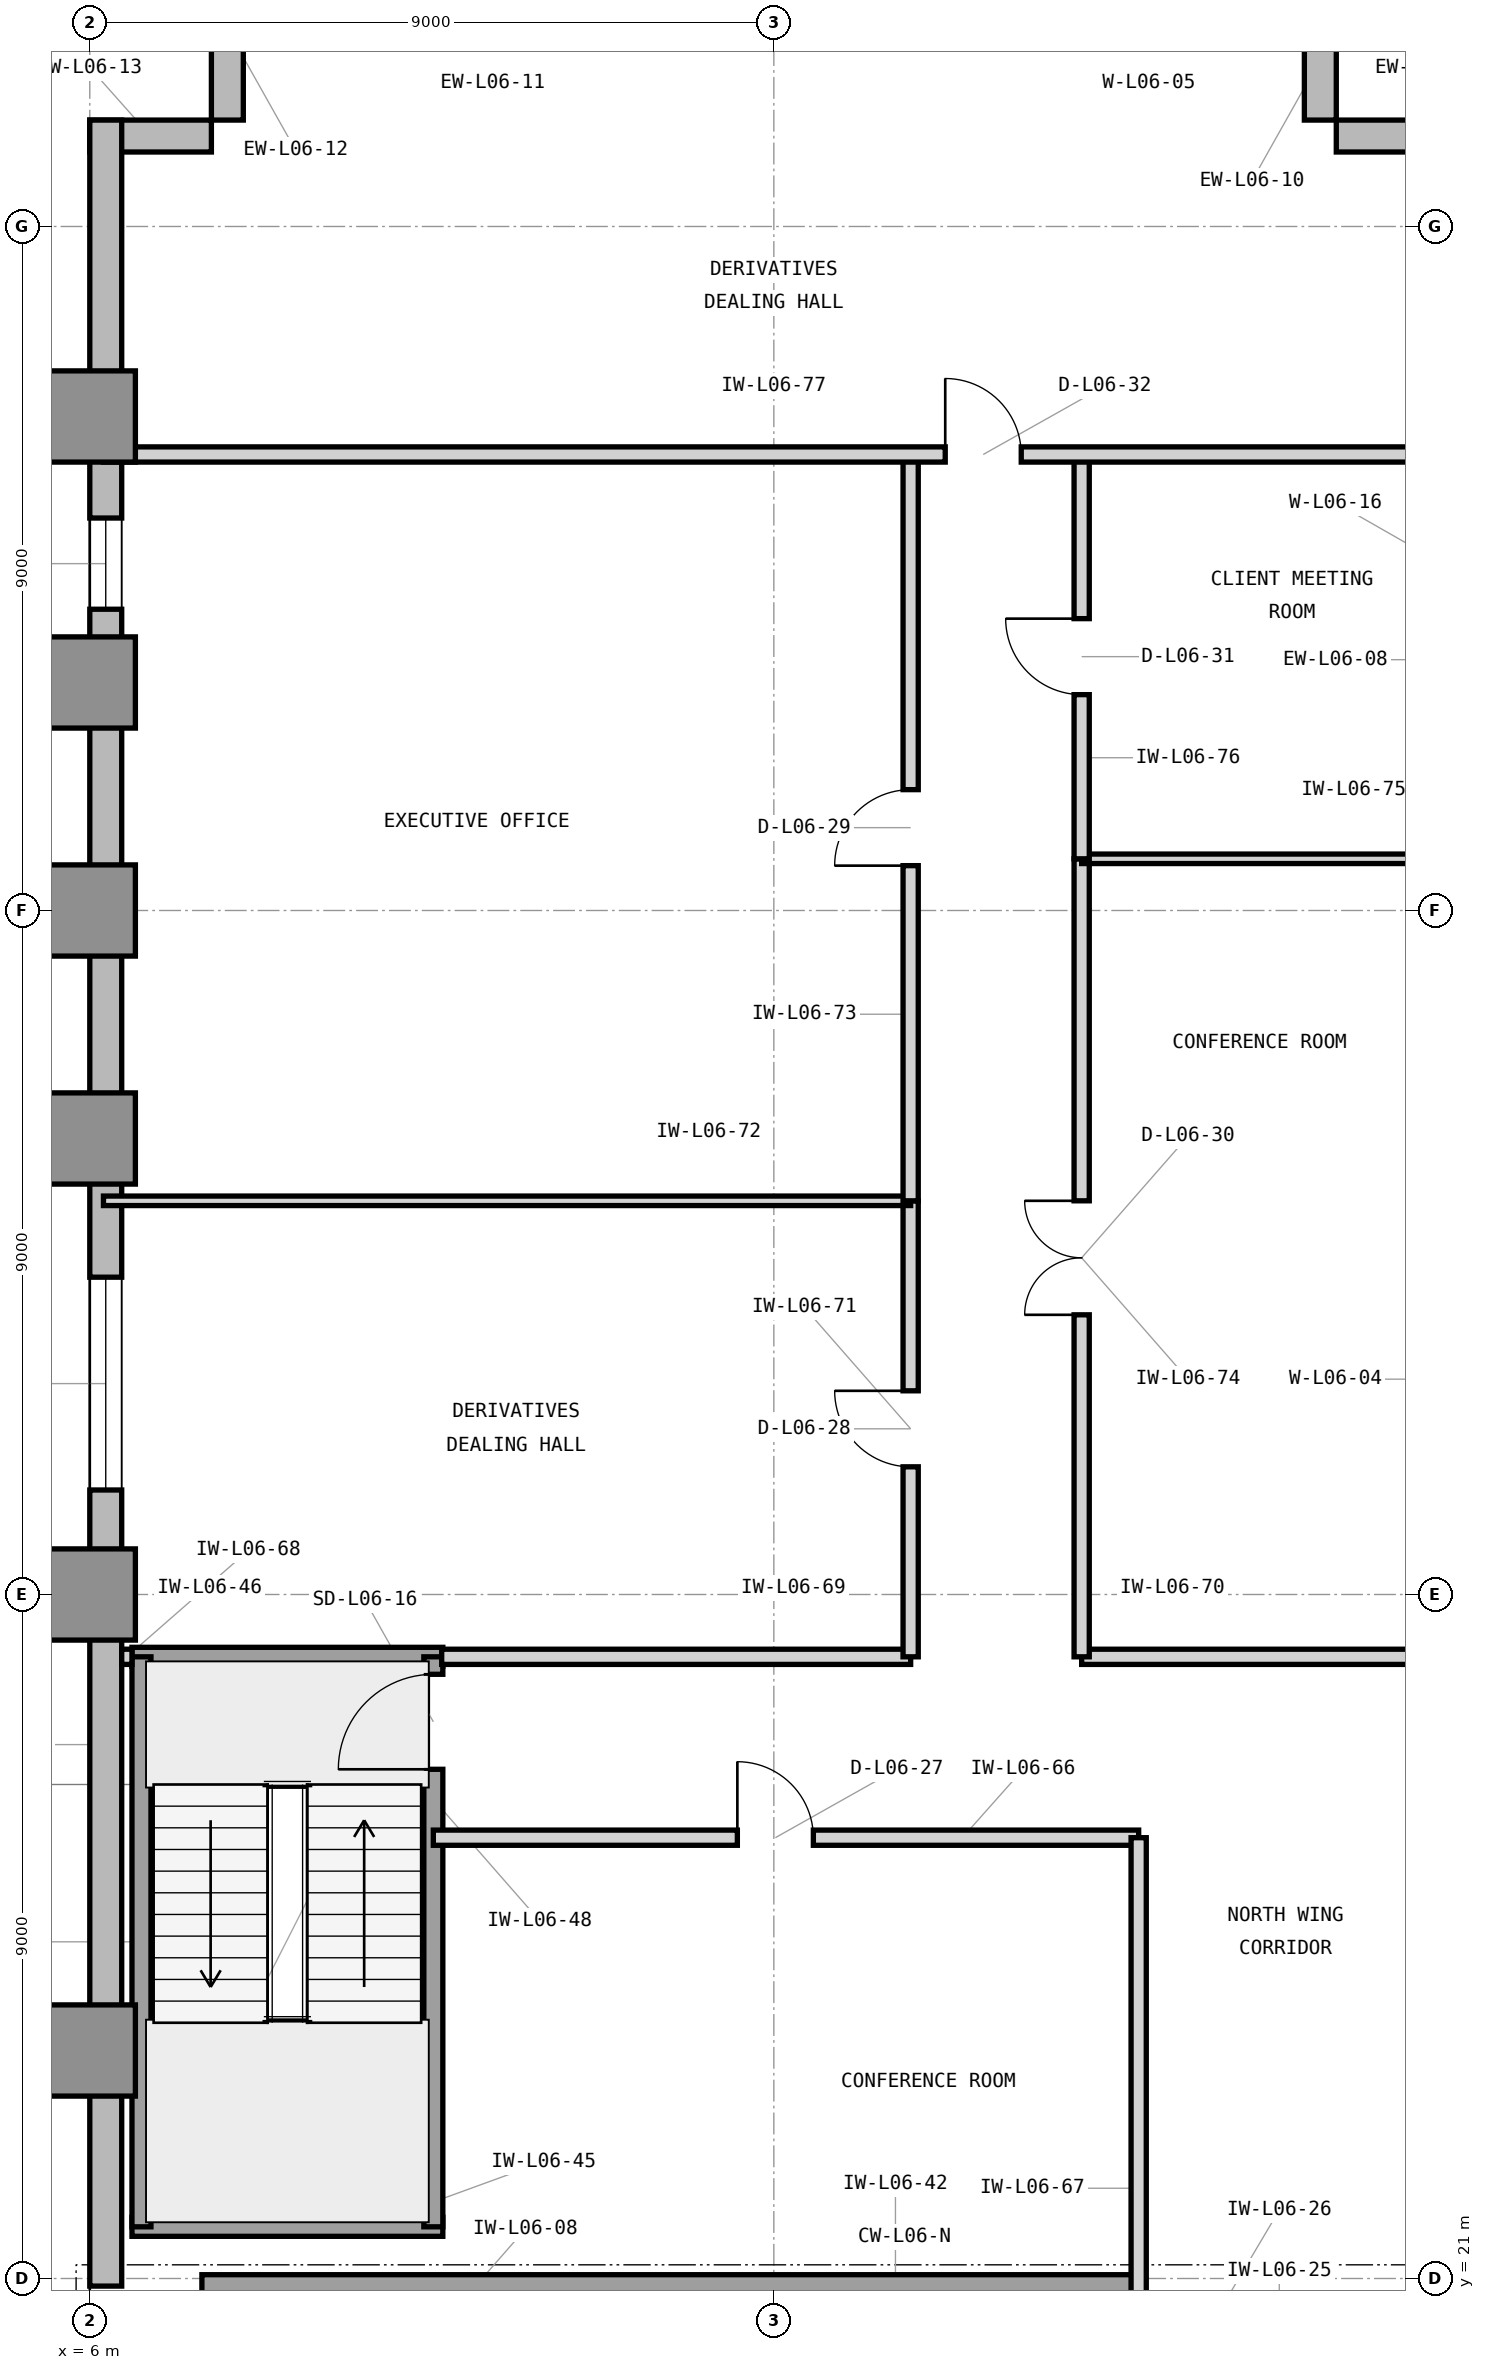
"""IFC4 building model, lengths in metres.
Left out: names, types, materials, properties, quantities, classifications, styles, units other than length and angle.
Written with IfcOpenShell. Run it as: python <this file> out.ifc"""

import sys

from ifc_helpers import new_model, si_unit, direction, frame, frame_2d, origin, origin_2d, place, context, subcontext, project, spatial, rectangle, extrude, element, fill, save


model = new_model("IFC4")
c1 = context("Model", 3, precision=1e-05, world=origin(), true_north=direction((0.0, 1.0)))
c2 = subcontext(c1, "Body", "Model", "MODEL_VIEW")
j1 = project(units=[si_unit("LENGTHUNIT", "METRE"), si_unit("PLANEANGLEUNIT", "RADIAN")], contexts=[c1])
p1 = place(None, origin())
s1 = spatial("IfcSite", under=j1, at=p1, CompositionType="ELEMENT")
p2 = place(p1, origin())
s2 = spatial("IfcBuilding", under=s1, at=p2, CompositionType="ELEMENT")
p3 = place(p2, frame((0.0, 0.0, 30.0)))
s3 = spatial("IfcBuildingStorey", under=s2, at=p3, CompositionType="ELEMENT", Elevation=30.0)
p4 = place(p3, frame((7.475, 20.65, 0.0), z_axis=(0.0, 0.0, 1.0), x_axis=(1.0, 0.0, 0.0)))
e1 = element("IfcWall", 1, at=p4, inside=s3, PredefinedType="SHEAR", context=c2, shape_type="SweptSolid", body=[
    extrude(rectangle(XDim=12.325, YDim=0.8, at=frame_2d((6.163, 0.0))), origin(), (0.0, 0.0, 1.0), 4.2),
])
for number, where, z_axis, x_axis in (
    (2, (6.0, 24.0, 0.0), (0.0, 0.0, 1.0), (1.0, 0.0, 0.0)),
    (3, (6.0, 30.0, 0.0), (0.0, 0.0, 1.0), (1.0, 0.0, 0.0)),
    (4, (6.0, 36.0, 0.0), (0.0, 0.0, 1.0), (1.0, 0.0, 0.0)),
    (5, (6.0, 39.0, 0.0), (0.0, 0.0, 1.0), (1.0, 0.0, 0.0)),
    (6, (6.0, 42.0, 0.0), (0.0, 0.0, 1.0), (1.0, 0.0, 0.0)),
    (7, (6.0, 45.5, 0.0), (0.0, 0.0, 1.0), (1.0, 0.0, 0.0)),
):
    element("IfcColumn", number, at=place(p3, frame(where, z_axis=z_axis, x_axis=x_axis)), inside=s3, PredefinedType="COLUMN", context=c2, shape_type="SweptSolid", body=[
        extrude(rectangle(XDim=1.2, YDim=1.2, at=origin_2d()), origin(), (0.0, 0.0, 1.0), 4.2),
    ])
for number, where, z_axis, x_axis in (
    (8, (24.0, 49.19, 0.0), (0.0, 0.0, 1.0), (-1.0, 0.0, 0.0)),
    (9, (22.19, 49.4, 0.0), (0.0, 0.0, 1.0), (0.0, 1.0, 0.0)),
    (10, (7.81, 51.0, 0.0), (0.0, 0.0, 1.0), (0.0, -1.0, 0.0)),
    (11, (7.6, 49.19, 0.0), (0.0, 0.0, 1.0), (-1.0, 0.0, 0.0)),
):
    element("IfcWall", number, at=place(p3, frame(where, z_axis=z_axis, x_axis=x_axis)), inside=s3, PredefinedType="STANDARD", context=c2, shape_type="SweptSolid", body=[
        extrude(rectangle(XDim=1.6, YDim=0.42, at=frame_2d((0.8, 0.0))), origin(), (0.0, 0.0, 1.0), 3.98),
    ])
p5 = place(p3, frame((6.21, 49.4, 0.0), z_axis=(0.0, 0.0, 1.0), x_axis=(0.0, -1.0, 0.0)))
e12 = element("IfcWall", 12, at=p5, inside=s3, PredefinedType="STANDARD", context=c2, shape_type="SweptSolid", body=[
    extrude(rectangle(XDim=28.5, YDim=0.42, at=frame_2d((14.25, 0.0))), origin(), (0.0, 0.0, 1.0), 3.98),
])
p6 = place(p5, frame((15.225, 0.0, 0.85)))
e13 = element("IfcOpeningElement", 13, at=p6, cuts=e12, PredefinedType="OPENING", context=c2, shape_type="SweptSolid", body=[
    extrude(rectangle(XDim=2.8, YDim=2.45, at=frame_2d((1.4, 1.225))), frame((0.0, 0.22, 0.0), z_axis=(0.0, -1.0, 0.0), x_axis=(1.0, 0.0, 0.0)), (0.0, 0.0, 1.0), 0.44),
])
p7 = place(p5, frame((5.236, 0.0, 0.85)))
e14 = element("IfcOpeningElement", 14, at=p7, cuts=e12, PredefinedType="OPENING", context=c2, shape_type="SweptSolid", body=[
    extrude(rectangle(XDim=1.2, YDim=2.45, at=frame_2d((0.6, 1.225))), frame((0.0, 0.22, 0.0), z_axis=(0.0, -1.0, 0.0), x_axis=(1.0, 0.0, 0.0)), (0.0, 0.0, 1.0), 0.44),
])
for number, where, z_axis, x_axis in (
    (15, (6.555, 21.68, 0.0), (0.0, 0.0, 1.0), (1.0, 0.0, 0.0)),
    (16, (6.555, 29.18, 0.0), (0.0, 0.0, 1.0), (1.0, 0.0, 0.0)),
):
    element("IfcWall", number, at=place(p3, frame(where, z_axis=z_axis, x_axis=x_axis)), inside=s3, PredefinedType="SHEAR", context=c2, shape_type="SweptSolid", body=[
        extrude(rectangle(XDim=4.09, YDim=0.25, at=frame_2d((2.045, 0.0))), origin(), (0.0, 0.0, 1.0), 4.2),
    ])
p8 = place(p3, frame((6.68, 21.68, 0.0), z_axis=(0.0, 0.0, 1.0), x_axis=(0.0, 1.0, 0.0)))
e17 = element("IfcWall", 17, at=p8, inside=s3, PredefinedType="SHEAR", context=c2, shape_type="SweptSolid", body=[
    extrude(rectangle(XDim=7.5, YDim=0.25, at=frame_2d((3.75, 0.0))), origin(), (0.0, 0.0, 1.0), 4.2),
])
p9 = place(p3, frame((10.52, 21.68, 0.0), z_axis=(0.0, 0.0, 1.0), x_axis=(0.0, 1.0, 0.0)))
e18 = element("IfcWall", 18, at=p9, inside=s3, PredefinedType="SHEAR", context=c2, shape_type="SweptSolid", body=[
    extrude(rectangle(XDim=7.5, YDim=0.25, at=frame_2d((3.75, 0.0))), origin(), (0.0, 0.0, 1.0), 4.2),
])
p10 = place(p9, frame((6.02, 0.0, 0.0)))
e19 = element("IfcOpeningElement", 19, at=p10, cuts=e18, PredefinedType="OPENING", context=c2, shape_type="SweptSolid", body=[
    extrude(rectangle(XDim=1.25, YDim=2.2, at=frame_2d((0.625, 1.1))), frame((0.0, 0.135, 0.0), z_axis=(0.0, -1.0, 0.0), x_axis=(1.0, 0.0, 0.0)), (0.0, 0.0, 1.0), 0.27),
])
p11 = place(p3, frame((10.52, 26.8, 0.0), z_axis=(0.0, 0.0, 1.0), x_axis=(1.0, 0.0, 0.0)))
e20 = element("IfcWall", 20, at=p11, inside=s3, PredefinedType="PARTITIONING", context=c2, shape_type="SweptSolid", body=[
    extrude(rectangle(XDim=9.28, YDim=0.2, at=frame_2d((4.64, 0.0))), origin(), (0.0, 0.0, 1.0), 3.97),
])
p12 = place(p11, frame((4.0, 0.0, 0.0)))
e21 = element("IfcOpeningElement", 21, at=p12, cuts=e20, PredefinedType="OPENING", context=c2, shape_type="SweptSolid", body=[
    extrude(rectangle(XDim=1.0, YDim=2.15, at=frame_2d((0.5, 1.075))), frame((0.0, 0.11, 0.0), z_axis=(0.0, -1.0, 0.0), x_axis=(1.0, 0.0, 0.0)), (0.0, 0.0, 1.0), 0.22),
])
p13 = place(p3, frame((19.8, 20.65, 0.0), z_axis=(0.0, 0.0, 1.0), x_axis=(0.0, 1.0, 0.0)))
e22 = element("IfcWall", 22, at=p13, inside=s3, PredefinedType="PARTITIONING", context=c2, shape_type="SweptSolid", body=[
    extrude(rectangle(XDim=6.15, YDim=0.2, at=frame_2d((3.075, 0.0))), origin(), (0.0, 0.0, 1.0), 3.97),
])
p14 = place(p3, frame((6.42, 29.18, 0.0), z_axis=(0.0, 0.0, 1.0), x_axis=(1.0, 0.0, 0.0)))
e23 = element("IfcWall", 23, at=p14, inside=s3, PredefinedType="PARTITIONING", context=c2, shape_type="SweptSolid", body=[
    extrude(rectangle(XDim=0.135, YDim=0.2, at=frame_2d((0.067, 0.0))), origin(), (0.0, 0.0, 1.0), 3.97),
])
p15 = place(p3, frame((10.63, 29.18, 0.0), z_axis=(0.0, 0.0, 1.0), x_axis=(1.0, 0.0, 0.0)))
e24 = element("IfcWall", 24, at=p15, inside=s3, PredefinedType="PARTITIONING", context=c2, shape_type="SweptSolid", body=[
    extrude(rectangle(XDim=6.17, YDim=0.2, at=frame_2d((3.085, 0.0))), origin(), (0.0, 0.0, 1.0), 3.97),
])
p16 = place(p3, frame((19.05, 29.18, 0.0), z_axis=(0.0, 0.0, 1.0), x_axis=(1.0, 0.0, 0.0)))
e25 = element("IfcWall", 25, at=p16, inside=s3, PredefinedType="PARTITIONING", context=c2, shape_type="SweptSolid", body=[
    extrude(rectangle(XDim=4.77, YDim=0.2, at=frame_2d((2.385, 0.0))), origin(), (0.0, 0.0, 1.0), 3.97),
])
p17 = place(p3, frame((16.8, 29.18, 0.0), z_axis=(0.0, 0.0, 1.0), x_axis=(0.0, 1.0, 0.0)))
e26 = element("IfcWall", 26, at=p17, inside=s3, PredefinedType="PARTITIONING", context=c2, shape_type="SweptSolid", body=[
    extrude(rectangle(XDim=6.0, YDim=0.2, at=frame_2d((3.0, 0.0))), origin(), (0.0, 0.0, 1.0), 3.97),
])
p18 = place(p17, frame((2.5, 0.0, 0.0)))
e27 = element("IfcOpeningElement", 27, at=p18, cuts=e26, PredefinedType="OPENING", context=c2, shape_type="SweptSolid", body=[
    extrude(rectangle(XDim=1.0, YDim=2.15, at=frame_2d((0.5, 1.075))), frame((0.0, 0.11, 0.0), z_axis=(0.0, -1.0, 0.0), x_axis=(1.0, 0.0, 0.0)), (0.0, 0.0, 1.0), 0.22),
])
p19 = place(p3, frame((6.18, 35.18, 0.0), z_axis=(0.0, 0.0, 1.0), x_axis=(1.0, 0.0, 0.0)))
e28 = element("IfcWall", 28, at=p19, inside=s3, PredefinedType="PARTITIONING", context=c2, shape_type="SweptSolid", body=[
    extrude(rectangle(XDim=10.62, YDim=0.125, at=frame_2d((5.31, 0.0))), origin(), (0.0, 0.0, 1.0), 3.97),
])
p20 = place(p3, frame((16.8, 35.18, 0.0), z_axis=(0.0, 0.0, 1.0), x_axis=(0.0, 1.0, 0.0)))
e29 = element("IfcWall", 29, at=p20, inside=s3, PredefinedType="PARTITIONING", context=c2, shape_type="SweptSolid", body=[
    extrude(rectangle(XDim=9.82, YDim=0.2, at=frame_2d((4.91, 0.0))), origin(), (0.0, 0.0, 1.0), 3.97),
])
p21 = place(p20, frame((4.41, 0.0, 0.0)))
e30 = element("IfcOpeningElement", 30, at=p21, cuts=e29, PredefinedType="OPENING", context=c2, shape_type="SweptSolid", body=[
    extrude(rectangle(XDim=1.0, YDim=2.15, at=frame_2d((0.5, 1.075))), frame((0.0, 0.11, 0.0), z_axis=(0.0, -1.0, 0.0), x_axis=(1.0, 0.0, 0.0)), (0.0, 0.0, 1.0), 0.22),
])
p22 = place(p3, frame((19.05, 29.18, 0.0), z_axis=(0.0, 0.0, 1.0), x_axis=(0.0, 1.0, 0.0)))
e31 = element("IfcWall", 31, at=p22, inside=s3, PredefinedType="PARTITIONING", context=c2, shape_type="SweptSolid", body=[
    extrude(rectangle(XDim=10.5, YDim=0.2, at=frame_2d((5.25, 0.0))), origin(), (0.0, 0.0, 1.0), 3.97),
])
p23 = place(p22, frame((4.5, 0.0, 0.0)))
e32 = element("IfcOpeningElement", 32, at=p23, cuts=e31, PredefinedType="OPENING", context=c2, shape_type="SweptSolid", body=[
    extrude(rectangle(XDim=1.5, YDim=2.3, at=frame_2d((0.75, 1.15))), frame((0.0, 0.11, 0.0), z_axis=(0.0, -1.0, 0.0), x_axis=(1.0, 0.0, 0.0)), (0.0, 0.0, 1.0), 0.22),
])
p24 = place(p3, frame((19.05, 39.68, 0.0), z_axis=(0.0, 0.0, 1.0), x_axis=(1.0, 0.0, 0.0)))
e33 = element("IfcWall", 33, at=p24, inside=s3, PredefinedType="PARTITIONING", context=c2, shape_type="SweptSolid", body=[
    extrude(rectangle(XDim=4.77, YDim=0.125, at=frame_2d((2.385, 0.0))), origin(), (0.0, 0.0, 1.0), 3.97),
])
p25 = place(p3, frame((19.05, 39.68, 0.0), z_axis=(0.0, 0.0, 1.0), x_axis=(0.0, 1.0, 0.0)))
e34 = element("IfcWall", 34, at=p25, inside=s3, PredefinedType="PARTITIONING", context=c2, shape_type="SweptSolid", body=[
    extrude(rectangle(XDim=5.32, YDim=0.2, at=frame_2d((2.66, 0.0))), origin(), (0.0, 0.0, 1.0), 3.97),
])
p26 = place(p25, frame((2.16, 0.0, 0.0)))
e35 = element("IfcOpeningElement", 35, at=p26, cuts=e34, PredefinedType="OPENING", context=c2, shape_type="SweptSolid", body=[
    extrude(rectangle(XDim=1.0, YDim=2.15, at=frame_2d((0.5, 1.075))), frame((0.0, 0.11, 0.0), z_axis=(0.0, -1.0, 0.0), x_axis=(1.0, 0.0, 0.0)), (0.0, 0.0, 1.0), 0.22),
])
p27 = place(p3, frame((6.18, 45.0, 0.0), z_axis=(0.0, 0.0, 1.0), x_axis=(1.0, 0.0, 0.0)))
e36 = element("IfcWall", 36, at=p27, inside=s3, PredefinedType="PARTITIONING", context=c2, shape_type="SweptSolid", body=[
    extrude(rectangle(XDim=17.64, YDim=0.2, at=frame_2d((8.82, 0.0))), origin(), (0.0, 0.0, 1.0), 3.97),
])
p28 = place(p27, frame((11.075, 0.0, 0.0)))
e37 = element("IfcOpeningElement", 37, at=p28, cuts=e36, PredefinedType="OPENING", context=c2, shape_type="SweptSolid", body=[
    extrude(rectangle(XDim=1.0, YDim=2.15, at=frame_2d((0.5, 1.075))), frame((0.0, 0.11, 0.0), z_axis=(0.0, -1.0, 0.0), x_axis=(1.0, 0.0, 0.0)), (0.0, 0.0, 1.0), 0.22),
])
p29 = place(p6, origin())
e38 = element("IfcWindow", 38, at=p29, inside=s3, PartitioningType="SINGLE_PANEL", PredefinedType="WINDOW", context=c2, shape_type="SweptSolid", body=[
    extrude(rectangle(XDim=2.8, YDim=2.45, at=frame_2d((1.4, 1.225))), frame((0.0, 0.11, 0.0), z_axis=(0.0, -1.0, 0.0), x_axis=(1.0, 0.0, 0.0)), (0.0, 0.0, 1.0), 0.06),
])
fill(e13, e38)
p30 = place(p10, origin())
e39 = element("IfcDoor", 39, at=p30, inside=s3, OperationType="SINGLE_SWING_LEFT", PredefinedType="DOOR", context=c2, shape_type="SweptSolid", body=[
    extrude(rectangle(XDim=1.25, YDim=2.2, at=frame_2d((0.625, 1.1))), frame((0.0, 0.025, 0.0), z_axis=(0.0, -1.0, 0.0), x_axis=(1.0, 0.0, 0.0)), (0.0, 0.0, 1.0), 0.05),
])
fill(e19, e39)
p31 = place(p12, origin())
e40 = element("IfcDoor", 40, at=p31, inside=s3, OperationType="SINGLE_SWING_LEFT", PredefinedType="DOOR", context=c2, shape_type="SweptSolid", body=[
    extrude(rectangle(XDim=1.0, YDim=2.15, at=frame_2d((0.5, 1.075))), frame((0.0, 0.025, 0.0), z_axis=(0.0, -1.0, 0.0), x_axis=(1.0, 0.0, 0.0)), (0.0, 0.0, 1.0), 0.05),
])
fill(e21, e40)
p32 = place(p18, origin())
e41 = element("IfcDoor", 41, at=p32, inside=s3, OperationType="SINGLE_SWING_RIGHT", PredefinedType="DOOR", context=c2, shape_type="SweptSolid", body=[
    extrude(rectangle(XDim=1.0, YDim=2.15, at=frame_2d((0.5, 1.075))), frame((0.0, 0.025, 0.0), z_axis=(0.0, -1.0, 0.0), x_axis=(1.0, 0.0, 0.0)), (0.0, 0.0, 1.0), 0.05),
])
fill(e27, e41)
p33 = place(p21, origin())
e42 = element("IfcDoor", 42, at=p33, inside=s3, OperationType="SINGLE_SWING_LEFT", PredefinedType="DOOR", context=c2, shape_type="SweptSolid", body=[
    extrude(rectangle(XDim=1.0, YDim=2.15, at=frame_2d((0.5, 1.075))), frame((0.0, 0.025, 0.0), z_axis=(0.0, -1.0, 0.0), x_axis=(1.0, 0.0, 0.0)), (0.0, 0.0, 1.0), 0.05),
])
fill(e30, e42)
p34 = place(p23, origin())
e43 = element("IfcDoor", 43, at=p34, inside=s3, OperationType="DOUBLE_DOOR_SINGLE_SWING", PredefinedType="DOOR", context=c2, shape_type="SweptSolid", body=[
    extrude(rectangle(XDim=1.5, YDim=2.3, at=frame_2d((0.75, 1.15))), frame((0.0, 0.025, 0.0), z_axis=(0.0, -1.0, 0.0), x_axis=(1.0, 0.0, 0.0)), (0.0, 0.0, 1.0), 0.05),
])
fill(e32, e43)
p35 = place(p26, origin())
e44 = element("IfcDoor", 44, at=p35, inside=s3, OperationType="SINGLE_SWING_RIGHT", PredefinedType="DOOR", context=c2, shape_type="SweptSolid", body=[
    extrude(rectangle(XDim=1.0, YDim=2.15, at=frame_2d((0.5, 1.075))), frame((0.0, 0.025, 0.0), z_axis=(0.0, -1.0, 0.0), x_axis=(1.0, 0.0, 0.0)), (0.0, 0.0, 1.0), 0.05),
])
fill(e35, e44)
p36 = place(p28, origin())
e45 = element("IfcDoor", 45, at=p36, inside=s3, OperationType="SINGLE_SWING_LEFT", PredefinedType="DOOR", context=c2, shape_type="SweptSolid", body=[
    extrude(rectangle(XDim=1.0, YDim=2.15, at=frame_2d((0.5, 1.075))), frame((0.0, 0.025, 0.0), z_axis=(0.0, -1.0, 0.0), x_axis=(1.0, 0.0, 0.0)), (0.0, 0.0, 1.0), 0.05),
])
fill(e37, e45)
p37 = place(p7, origin())
e46 = element("IfcWindow", 46, at=p37, inside=s3, PartitioningType="SINGLE_PANEL", PredefinedType="WINDOW", context=c2, shape_type="SweptSolid", body=[
    extrude(rectangle(XDim=1.2, YDim=2.45, at=frame_2d((0.6, 1.225))), frame((0.0, 0.11, 0.0), z_axis=(0.0, -1.0, 0.0), x_axis=(1.0, 0.0, 0.0)), (0.0, 0.0, 1.0), 0.06),
])
fill(e14, e46)
save(model, sys.argv[1])
